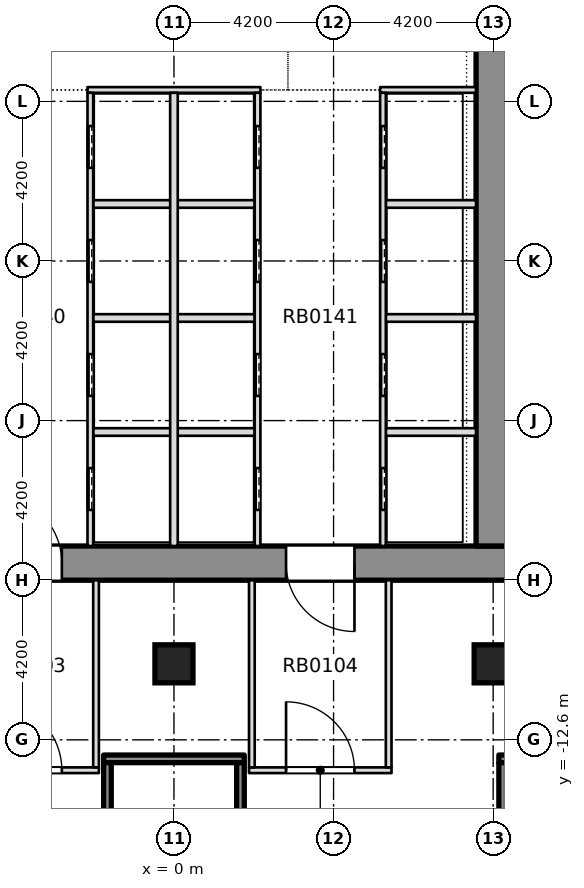
"""IFC4 building model, lengths in metres.
Left out: names, types, materials, properties, quantities, classifications, styles, units other than length and angle.
Written with IfcOpenShell. Run it as: python <this file> out.ifc"""

import sys

from ifc_helpers import new_model, si_unit, direction, frame, frame_2d, origin, origin_2d, place, context, subcontext, project, spatial, rectangle, extrude, element, fill, save


model = new_model("IFC4")
c1 = context("Model", 3, precision=1e-05, world=origin(), true_north=direction((0.0, 1.0)))
c2 = subcontext(c1, "Body", "Model", "MODEL_VIEW")
j1 = project(units=[si_unit("LENGTHUNIT", "METRE"), si_unit("PLANEANGLEUNIT", "RADIAN")], contexts=[c1])
p1 = place(None, origin())
s1 = spatial("IfcSite", under=j1, at=p1, CompositionType="ELEMENT")
p2 = place(p1, origin())
s2 = spatial("IfcBuilding", under=s1, at=p2, CompositionType="ELEMENT")
p3 = place(p2, frame((0.0, 0.0, -4.2)))
s3 = spatial("IfcBuildingStorey", under=s2, at=p3, CompositionType="ELEMENT", Elevation=-4.2)
p4 = place(p3, frame((-11.7, -7.95, -0.35), z_axis=(0.0, 0.0, 1.0), x_axis=(1.0, 0.0, 0.0)))
e1 = element("IfcWall", 1, at=p4, inside=s3, PredefinedType="SHEAR", context=c2, shape_type="SweptSolid", body=[
    extrude(rectangle(XDim=23.4, YDim=0.9, at=frame_2d((11.7, 0.0))), origin(), (0.0, 0.0, 1.0), 4.1),
])
p5 = place(p4, frame((6.95, 0.0, 0.35)))
e2 = element("IfcOpeningElement", 2, at=p5, cuts=e1, PredefinedType="OPENING", context=c2, shape_type="SweptSolid", body=[
    extrude(rectangle(XDim=1.8, YDim=2.1, at=frame_2d((0.9, 1.05))), frame((0.0, 0.46, 0.0), z_axis=(0.0, -1.0, 0.0), x_axis=(1.0, 0.0, 0.0)), (0.0, 0.0, 1.0), 0.92),
])
p6 = place(p4, frame((14.65, 0.0, 0.35)))
e3 = element("IfcOpeningElement", 3, at=p6, cuts=e1, PredefinedType="OPENING", context=c2, shape_type="SweptSolid", body=[
    extrude(rectangle(XDim=1.8, YDim=2.1, at=frame_2d((0.9, 1.05))), frame((0.0, 0.46, 0.0), z_axis=(0.0, -1.0, 0.0), x_axis=(1.0, 0.0, 0.0)), (0.0, 0.0, 1.0), 0.92),
])
p7 = place(p3, frame((8.4, -7.5, -0.35), z_axis=(0.0, 0.0, 1.0), x_axis=(0.0, 1.0, 0.0)))
e4 = element("IfcWall", 4, at=p7, inside=s3, PredefinedType="SHEAR", context=c2, shape_type="SweptSolid", body=[
    extrude(rectangle(XDim=28.35, YDim=0.9, at=frame_2d((14.175, 0.0))), origin(), (0.0, 0.0, 1.0), 4.1),
])
p8 = place(p7, frame((18.4, 0.0, 0.35)))
e5 = element("IfcOpeningElement", 5, at=p8, cuts=e4, PredefinedType="OPENING", context=c2, shape_type="SweptSolid", body=[
    extrude(rectangle(XDim=1.2, YDim=2.1, at=frame_2d((0.6, 1.05))), frame((0.0, 0.46, 0.0), z_axis=(0.0, -1.0, 0.0), x_axis=(1.0, 0.0, 0.0)), (0.0, 0.0, 1.0), 0.92),
])
for number, where, z_axis, x_axis in (
    (6, (0.0, -10.6, -0.35), (0.0, 0.0, 1.0), (1.0, 0.0, 0.0)),
    (7, (8.4, -10.6, -0.35), (0.0, 0.0, 1.0), (1.0, 0.0, 0.0)),
):
    element("IfcColumn", number, at=place(p3, frame(where, z_axis=z_axis, x_axis=x_axis)), inside=s3, PredefinedType="COLUMN", context=c2, shape_type="SweptSolid", body=[
        extrude(rectangle(XDim=1.0, YDim=1.0, at=origin_2d()), origin(), (0.0, 0.0, 1.0), 4.1),
    ])
p9 = place(p3, frame((-5.725, -13.4, 0.0), z_axis=(0.0, 0.0, 1.0), x_axis=(1.0, 0.0, 0.0)))
e8 = element("IfcWall", 8, at=p9, inside=s3, PredefinedType="PARTITIONING", context=c2, shape_type="SweptSolid", body=[
    extrude(rectangle(XDim=3.75, YDim=0.15, at=frame_2d((1.875, 0.0))), origin(), (0.0, 0.0, 1.0), 3.75),
])
p10 = place(p9, frame((0.975, 0.0, 0.0)))
e9 = element("IfcOpeningElement", 9, at=p10, cuts=e8, PredefinedType="OPENING", context=c2, shape_type="SweptSolid", body=[
    extrude(rectangle(XDim=1.8, YDim=2.1, at=frame_2d((0.9, 1.05))), frame((0.0, 0.085, 0.0), z_axis=(0.0, -1.0, 0.0), x_axis=(1.0, 0.0, 0.0)), (0.0, 0.0, 1.0), 0.17),
])
p11 = place(p3, frame((1.975, -13.4, 0.0), z_axis=(0.0, 0.0, 1.0), x_axis=(1.0, 0.0, 0.0)))
e10 = element("IfcWall", 10, at=p11, inside=s3, PredefinedType="PARTITIONING", context=c2, shape_type="SweptSolid", body=[
    extrude(rectangle(XDim=3.75, YDim=0.15, at=frame_2d((1.875, 0.0))), origin(), (0.0, 0.0, 1.0), 3.75),
])
p12 = place(p11, frame((0.975, 0.0, 0.0)))
e11 = element("IfcOpeningElement", 11, at=p12, cuts=e10, PredefinedType="OPENING", context=c2, shape_type="SweptSolid", body=[
    extrude(rectangle(XDim=1.8, YDim=2.1, at=frame_2d((0.9, 1.05))), frame((0.0, 0.085, 0.0), z_axis=(0.0, -1.0, 0.0), x_axis=(1.0, 0.0, 0.0)), (0.0, 0.0, 1.0), 0.17),
])
for number, where, z_axis, x_axis in (
    (12, (-2.05, -13.325, 0.0), (0.0, 0.0, 1.0), (0.0, 1.0, 0.0)),
    (13, (2.05, -13.325, 0.0), (0.0, 0.0, 1.0), (0.0, 1.0, 0.0)),
    (14, (5.65, -13.325, 0.0), (0.0, 0.0, 1.0), (0.0, 1.0, 0.0)),
):
    element("IfcWall", number, at=place(p3, frame(where, z_axis=z_axis, x_axis=x_axis)), inside=s3, PredefinedType="PARTITIONING", context=c2, shape_type="SweptSolid", body=[
        extrude(rectangle(XDim=4.924, YDim=0.15, at=frame_2d((2.462, 0.0))), origin(), (0.0, 0.0, 1.0), 3.75),
    ])
p13 = place(p3, frame((-2.125, -4.5, 0.0), z_axis=(0.0, 0.0, 1.0), x_axis=(1.0, 0.0, 0.0)))
e15 = element("IfcWall", 15, at=p13, inside=s3, PredefinedType="PARTITIONING", context=c2, shape_type="SweptSolid", body=[
    extrude(rectangle(XDim=4.25, YDim=0.2, at=frame_2d((2.125, 0.0))), origin(), (0.0, 0.0, 1.0), 3.75),
])
p14 = place(p3, frame((5.575, -4.5, 0.0), z_axis=(0.0, 0.0, 1.0), x_axis=(1.0, 0.0, 0.0)))
e16 = element("IfcWall", 16, at=p14, inside=s3, PredefinedType="PARTITIONING", context=c2, shape_type="SweptSolid", body=[
    extrude(rectangle(XDim=2.374, YDim=0.2, at=frame_2d((1.187, 0.0))), origin(), (0.0, 0.0, 1.0), 3.75),
])
p15 = place(p3, frame((-2.125, -1.5, 0.0), z_axis=(0.0, 0.0, 1.0), x_axis=(1.0, 0.0, 0.0)))
e17 = element("IfcWall", 17, at=p15, inside=s3, PredefinedType="PARTITIONING", context=c2, shape_type="SweptSolid", body=[
    extrude(rectangle(XDim=4.25, YDim=0.2, at=frame_2d((2.125, 0.0))), origin(), (0.0, 0.0, 1.0), 3.75),
])
p16 = place(p3, frame((5.575, -1.5, 0.0), z_axis=(0.0, 0.0, 1.0), x_axis=(1.0, 0.0, 0.0)))
e18 = element("IfcWall", 18, at=p16, inside=s3, PredefinedType="PARTITIONING", context=c2, shape_type="SweptSolid", body=[
    extrude(rectangle(XDim=2.374, YDim=0.2, at=frame_2d((1.187, 0.0))), origin(), (0.0, 0.0, 1.0), 3.75),
])
p17 = place(p3, frame((-2.125, 1.5, 0.0), z_axis=(0.0, 0.0, 1.0), x_axis=(1.0, 0.0, 0.0)))
e19 = element("IfcWall", 19, at=p17, inside=s3, PredefinedType="PARTITIONING", context=c2, shape_type="SweptSolid", body=[
    extrude(rectangle(XDim=4.25, YDim=0.2, at=frame_2d((2.125, 0.0))), origin(), (0.0, 0.0, 1.0), 3.75),
])
p18 = place(p3, frame((5.575, 1.5, 0.0), z_axis=(0.0, 0.0, 1.0), x_axis=(1.0, 0.0, 0.0)))
e20 = element("IfcWall", 20, at=p18, inside=s3, PredefinedType="PARTITIONING", context=c2, shape_type="SweptSolid", body=[
    extrude(rectangle(XDim=2.374, YDim=0.2, at=frame_2d((1.187, 0.0))), origin(), (0.0, 0.0, 1.0), 3.75),
])
p19 = place(p3, frame((-2.275, 4.5, 0.0), z_axis=(0.0, 0.0, 1.0), x_axis=(1.0, 0.0, 0.0)))
e21 = element("IfcWall", 21, at=p19, inside=s3, PredefinedType="PARTITIONING", context=c2, shape_type="SweptSolid", body=[
    extrude(rectangle(XDim=4.55, YDim=0.15, at=frame_2d((2.275, 0.0))), origin(), (0.0, 0.0, 1.0), 3.75),
])
p20 = place(p3, frame((5.425, 4.5, 0.0), z_axis=(0.0, 0.0, 1.0), x_axis=(1.0, 0.0, 0.0)))
e22 = element("IfcWall", 22, at=p20, inside=s3, PredefinedType="PARTITIONING", context=c2, shape_type="SweptSolid", body=[
    extrude(rectangle(XDim=2.524, YDim=0.15, at=frame_2d((1.262, 0.0))), origin(), (0.0, 0.0, 1.0), 3.75),
])
p21 = place(p3, frame((-2.2, -7.499, 0.0), z_axis=(0.0, 0.0, 1.0), x_axis=(0.0, 1.0, 0.0)))
e23 = element("IfcWall", 23, at=p21, inside=s3, PredefinedType="PARTITIONING", context=c2, shape_type="SweptSolid", body=[
    extrude(rectangle(XDim=11.924, YDim=0.15, at=frame_2d((5.962, 0.0))), origin(), (0.0, 0.0, 1.0), 3.75),
])
p22 = place(p21, frame((0.949, 0.0, 0.0)))
e24 = element("IfcOpeningElement", 24, at=p22, cuts=e23, PredefinedType="OPENING", context=c2, shape_type="SweptSolid", body=[
    extrude(rectangle(XDim=1.1, YDim=2.1, at=frame_2d((0.55, 1.05))), frame((0.0, 0.085, 0.0), z_axis=(0.0, -1.0, 0.0), x_axis=(1.0, 0.0, 0.0)), (0.0, 0.0, 1.0), 0.17),
])
p23 = place(p21, frame((3.949, 0.0, 0.0)))
e25 = element("IfcOpeningElement", 25, at=p23, cuts=e23, PredefinedType="OPENING", context=c2, shape_type="SweptSolid", body=[
    extrude(rectangle(XDim=1.1, YDim=2.1, at=frame_2d((0.55, 1.05))), frame((0.0, 0.085, 0.0), z_axis=(0.0, -1.0, 0.0), x_axis=(1.0, 0.0, 0.0)), (0.0, 0.0, 1.0), 0.17),
])
p24 = place(p21, frame((6.949, 0.0, 0.0)))
e26 = element("IfcOpeningElement", 26, at=p24, cuts=e23, PredefinedType="OPENING", context=c2, shape_type="SweptSolid", body=[
    extrude(rectangle(XDim=1.1, YDim=2.1, at=frame_2d((0.55, 1.05))), frame((0.0, 0.085, 0.0), z_axis=(0.0, -1.0, 0.0), x_axis=(1.0, 0.0, 0.0)), (0.0, 0.0, 1.0), 0.17),
])
p25 = place(p21, frame((9.949, 0.0, 0.0)))
e27 = element("IfcOpeningElement", 27, at=p25, cuts=e23, PredefinedType="OPENING", context=c2, shape_type="SweptSolid", body=[
    extrude(rectangle(XDim=1.1, YDim=2.1, at=frame_2d((0.55, 1.05))), frame((0.0, 0.085, 0.0), z_axis=(0.0, -1.0, 0.0), x_axis=(1.0, 0.0, 0.0)), (0.0, 0.0, 1.0), 0.17),
])
p26 = place(p3, frame((0.0, -7.499, 0.0), z_axis=(0.0, 0.0, 1.0), x_axis=(0.0, 1.0, 0.0)))
e28 = element("IfcWall", 28, at=p26, inside=s3, PredefinedType="PARTITIONING", context=c2, shape_type="SweptSolid", body=[
    extrude(rectangle(XDim=11.924, YDim=0.2, at=frame_2d((5.962, 0.0))), origin(), (0.0, 0.0, 1.0), 3.75),
])
p27 = place(p3, frame((2.2, -7.499, 0.0), z_axis=(0.0, 0.0, 1.0), x_axis=(0.0, 1.0, 0.0)))
e29 = element("IfcWall", 29, at=p27, inside=s3, PredefinedType="PARTITIONING", context=c2, shape_type="SweptSolid", body=[
    extrude(rectangle(XDim=11.924, YDim=0.15, at=frame_2d((5.962, 0.0))), origin(), (0.0, 0.0, 1.0), 3.75),
])
p28 = place(p27, frame((0.949, 0.0, 0.0)))
e30 = element("IfcOpeningElement", 30, at=p28, cuts=e29, PredefinedType="OPENING", context=c2, shape_type="SweptSolid", body=[
    extrude(rectangle(XDim=1.1, YDim=2.1, at=frame_2d((0.55, 1.05))), frame((0.0, 0.085, 0.0), z_axis=(0.0, -1.0, 0.0), x_axis=(1.0, 0.0, 0.0)), (0.0, 0.0, 1.0), 0.17),
])
p29 = place(p27, frame((3.949, 0.0, 0.0)))
e31 = element("IfcOpeningElement", 31, at=p29, cuts=e29, PredefinedType="OPENING", context=c2, shape_type="SweptSolid", body=[
    extrude(rectangle(XDim=1.1, YDim=2.1, at=frame_2d((0.55, 1.05))), frame((0.0, 0.085, 0.0), z_axis=(0.0, -1.0, 0.0), x_axis=(1.0, 0.0, 0.0)), (0.0, 0.0, 1.0), 0.17),
])
p30 = place(p27, frame((6.949, 0.0, 0.0)))
e32 = element("IfcOpeningElement", 32, at=p30, cuts=e29, PredefinedType="OPENING", context=c2, shape_type="SweptSolid", body=[
    extrude(rectangle(XDim=1.1, YDim=2.1, at=frame_2d((0.55, 1.05))), frame((0.0, 0.085, 0.0), z_axis=(0.0, -1.0, 0.0), x_axis=(1.0, 0.0, 0.0)), (0.0, 0.0, 1.0), 0.17),
])
p31 = place(p27, frame((9.949, 0.0, 0.0)))
e33 = element("IfcOpeningElement", 33, at=p31, cuts=e29, PredefinedType="OPENING", context=c2, shape_type="SweptSolid", body=[
    extrude(rectangle(XDim=1.1, YDim=2.1, at=frame_2d((0.55, 1.05))), frame((0.0, 0.085, 0.0), z_axis=(0.0, -1.0, 0.0), x_axis=(1.0, 0.0, 0.0)), (0.0, 0.0, 1.0), 0.17),
])
p32 = place(p3, frame((5.5, -7.499, 0.0), z_axis=(0.0, 0.0, 1.0), x_axis=(0.0, 1.0, 0.0)))
e34 = element("IfcWall", 34, at=p32, inside=s3, PredefinedType="PARTITIONING", context=c2, shape_type="SweptSolid", body=[
    extrude(rectangle(XDim=11.924, YDim=0.15, at=frame_2d((5.962, 0.0))), origin(), (0.0, 0.0, 1.0), 3.75),
])
p33 = place(p32, frame((0.949, 0.0, 0.0)))
e35 = element("IfcOpeningElement", 35, at=p33, cuts=e34, PredefinedType="OPENING", context=c2, shape_type="SweptSolid", body=[
    extrude(rectangle(XDim=1.1, YDim=2.1, at=frame_2d((0.55, 1.05))), frame((0.0, 0.085, 0.0), z_axis=(0.0, -1.0, 0.0), x_axis=(1.0, 0.0, 0.0)), (0.0, 0.0, 1.0), 0.17),
])
p34 = place(p32, frame((3.949, 0.0, 0.0)))
e36 = element("IfcOpeningElement", 36, at=p34, cuts=e34, PredefinedType="OPENING", context=c2, shape_type="SweptSolid", body=[
    extrude(rectangle(XDim=1.1, YDim=2.1, at=frame_2d((0.55, 1.05))), frame((0.0, 0.085, 0.0), z_axis=(0.0, -1.0, 0.0), x_axis=(1.0, 0.0, 0.0)), (0.0, 0.0, 1.0), 0.17),
])
p35 = place(p32, frame((6.949, 0.0, 0.0)))
e37 = element("IfcOpeningElement", 37, at=p35, cuts=e34, PredefinedType="OPENING", context=c2, shape_type="SweptSolid", body=[
    extrude(rectangle(XDim=1.1, YDim=2.1, at=frame_2d((0.55, 1.05))), frame((0.0, 0.085, 0.0), z_axis=(0.0, -1.0, 0.0), x_axis=(1.0, 0.0, 0.0)), (0.0, 0.0, 1.0), 0.17),
])
p36 = place(p32, frame((9.949, 0.0, 0.0)))
e38 = element("IfcOpeningElement", 38, at=p36, cuts=e34, PredefinedType="OPENING", context=c2, shape_type="SweptSolid", body=[
    extrude(rectangle(XDim=1.1, YDim=2.1, at=frame_2d((0.55, 1.05))), frame((0.0, 0.085, 0.0), z_axis=(0.0, -1.0, 0.0), x_axis=(1.0, 0.0, 0.0)), (0.0, 0.0, 1.0), 0.17),
])
p37 = place(p3, frame((-1.85, -13.1, 0.0), z_axis=(0.0, 0.0, 1.0), x_axis=(1.0, 0.0, 0.0)))
e39 = element("IfcWall", 39, at=p37, inside=s3, PredefinedType="SOLIDWALL", context=c2, shape_type="SweptSolid", body=[
    extrude(rectangle(XDim=3.7, YDim=0.2, at=frame_2d((1.85, 0.0))), origin(), (0.0, 0.0, 1.0), 3.75),
])
for number, where, z_axis, x_axis in (
    (40, (-1.75, -19.8, 0.0), (0.0, 0.0, 1.0), (0.0, 1.0, 0.0)),
    (41, (1.75, -19.8, 0.0), (0.0, 0.0, 1.0), (0.0, 1.0, 0.0)),
):
    element("IfcWall", number, at=place(p3, frame(where, z_axis=z_axis, x_axis=x_axis)), inside=s3, PredefinedType="SOLIDWALL", context=c2, shape_type="SweptSolid", body=[
        extrude(rectangle(XDim=6.6, YDim=0.2, at=frame_2d((3.3, 0.0))), origin(), (0.0, 0.0, 1.0), 3.75),
    ])
p38 = place(p3, frame((8.55, -13.1, 0.0), z_axis=(0.0, 0.0, 1.0), x_axis=(1.0, 0.0, 0.0)))
e42 = element("IfcWall", 42, at=p38, inside=s3, PredefinedType="SOLIDWALL", context=c2, shape_type="SweptSolid", body=[
    extrude(rectangle(XDim=3.7, YDim=0.2, at=frame_2d((1.85, 0.0))), origin(), (0.0, 0.0, 1.0), 3.75),
])
p39 = place(p3, frame((8.65, -20.3, 0.0), z_axis=(0.0, 0.0, 1.0), x_axis=(0.0, 1.0, 0.0)))
e43 = element("IfcWall", 43, at=p39, inside=s3, PredefinedType="SOLIDWALL", context=c2, shape_type="SweptSolid", body=[
    extrude(rectangle(XDim=7.1, YDim=0.2, at=frame_2d((3.55, 0.0))), origin(), (0.0, 0.0, 1.0), 3.75),
])
p40 = place(p10, origin())
e44 = element("IfcDoor", 44, at=p40, inside=s3, OperationType="DOUBLE_DOOR_SINGLE_SWING", PredefinedType="DOOR", context=c2, shape_type="SweptSolid", body=[
    extrude(rectangle(XDim=1.8, YDim=2.1, at=frame_2d((0.9, 1.05))), frame((0.0, 0.025, 0.0), z_axis=(0.0, -1.0, 0.0), x_axis=(1.0, 0.0, 0.0)), (0.0, 0.0, 1.0), 0.05),
])
fill(e9, e44)
p41 = place(p12, origin())
e45 = element("IfcDoor", 45, at=p41, inside=s3, OperationType="DOUBLE_DOOR_SINGLE_SWING", PredefinedType="DOOR", context=c2, shape_type="SweptSolid", body=[
    extrude(rectangle(XDim=1.8, YDim=2.1, at=frame_2d((0.9, 1.05))), frame((0.0, 0.025, 0.0), z_axis=(0.0, -1.0, 0.0), x_axis=(1.0, 0.0, 0.0)), (0.0, 0.0, 1.0), 0.05),
])
fill(e11, e45)
p42 = place(p22, origin())
e46 = element("IfcDoor", 46, at=p42, inside=s3, OperationType="SLIDING_TO_RIGHT", PredefinedType="DOOR", context=c2, shape_type="SweptSolid", body=[
    extrude(rectangle(XDim=1.1, YDim=2.1, at=frame_2d((0.55, 1.05))), frame((0.0, 0.025, 0.0), z_axis=(0.0, -1.0, 0.0), x_axis=(1.0, 0.0, 0.0)), (0.0, 0.0, 1.0), 0.05),
])
fill(e24, e46)
p43 = place(p23, origin())
e47 = element("IfcDoor", 47, at=p43, inside=s3, OperationType="SLIDING_TO_RIGHT", PredefinedType="DOOR", context=c2, shape_type="SweptSolid", body=[
    extrude(rectangle(XDim=1.1, YDim=2.1, at=frame_2d((0.55, 1.05))), frame((0.0, 0.025, 0.0), z_axis=(0.0, -1.0, 0.0), x_axis=(1.0, 0.0, 0.0)), (0.0, 0.0, 1.0), 0.05),
])
fill(e25, e47)
p44 = place(p24, origin())
e48 = element("IfcDoor", 48, at=p44, inside=s3, OperationType="SLIDING_TO_RIGHT", PredefinedType="DOOR", context=c2, shape_type="SweptSolid", body=[
    extrude(rectangle(XDim=1.1, YDim=2.1, at=frame_2d((0.55, 1.05))), frame((0.0, 0.025, 0.0), z_axis=(0.0, -1.0, 0.0), x_axis=(1.0, 0.0, 0.0)), (0.0, 0.0, 1.0), 0.05),
])
fill(e26, e48)
p45 = place(p25, origin())
e49 = element("IfcDoor", 49, at=p45, inside=s3, OperationType="SLIDING_TO_RIGHT", PredefinedType="DOOR", context=c2, shape_type="SweptSolid", body=[
    extrude(rectangle(XDim=1.1, YDim=2.1, at=frame_2d((0.55, 1.05))), frame((0.0, 0.025, 0.0), z_axis=(0.0, -1.0, 0.0), x_axis=(1.0, 0.0, 0.0)), (0.0, 0.0, 1.0), 0.05),
])
fill(e27, e49)
p46 = place(p28, origin())
e50 = element("IfcDoor", 50, at=p46, inside=s3, OperationType="SLIDING_TO_RIGHT", PredefinedType="DOOR", context=c2, shape_type="SweptSolid", body=[
    extrude(rectangle(XDim=1.1, YDim=2.1, at=frame_2d((0.55, 1.05))), frame((0.0, 0.025, 0.0), z_axis=(0.0, -1.0, 0.0), x_axis=(1.0, 0.0, 0.0)), (0.0, 0.0, 1.0), 0.05),
])
fill(e30, e50)
p47 = place(p29, origin())
e51 = element("IfcDoor", 51, at=p47, inside=s3, OperationType="SLIDING_TO_RIGHT", PredefinedType="DOOR", context=c2, shape_type="SweptSolid", body=[
    extrude(rectangle(XDim=1.1, YDim=2.1, at=frame_2d((0.55, 1.05))), frame((0.0, 0.025, 0.0), z_axis=(0.0, -1.0, 0.0), x_axis=(1.0, 0.0, 0.0)), (0.0, 0.0, 1.0), 0.05),
])
fill(e31, e51)
p48 = place(p30, origin())
e52 = element("IfcDoor", 52, at=p48, inside=s3, OperationType="SLIDING_TO_RIGHT", PredefinedType="DOOR", context=c2, shape_type="SweptSolid", body=[
    extrude(rectangle(XDim=1.1, YDim=2.1, at=frame_2d((0.55, 1.05))), frame((0.0, 0.025, 0.0), z_axis=(0.0, -1.0, 0.0), x_axis=(1.0, 0.0, 0.0)), (0.0, 0.0, 1.0), 0.05),
])
fill(e32, e52)
p49 = place(p31, origin())
e53 = element("IfcDoor", 53, at=p49, inside=s3, OperationType="SLIDING_TO_RIGHT", PredefinedType="DOOR", context=c2, shape_type="SweptSolid", body=[
    extrude(rectangle(XDim=1.1, YDim=2.1, at=frame_2d((0.55, 1.05))), frame((0.0, 0.025, 0.0), z_axis=(0.0, -1.0, 0.0), x_axis=(1.0, 0.0, 0.0)), (0.0, 0.0, 1.0), 0.05),
])
fill(e33, e53)
p50 = place(p33, origin())
e54 = element("IfcDoor", 54, at=p50, inside=s3, OperationType="SLIDING_TO_RIGHT", PredefinedType="DOOR", context=c2, shape_type="SweptSolid", body=[
    extrude(rectangle(XDim=1.1, YDim=2.1, at=frame_2d((0.55, 1.05))), frame((0.0, 0.025, 0.0), z_axis=(0.0, -1.0, 0.0), x_axis=(1.0, 0.0, 0.0)), (0.0, 0.0, 1.0), 0.05),
])
fill(e35, e54)
p51 = place(p34, origin())
e55 = element("IfcDoor", 55, at=p51, inside=s3, OperationType="SLIDING_TO_RIGHT", PredefinedType="DOOR", context=c2, shape_type="SweptSolid", body=[
    extrude(rectangle(XDim=1.1, YDim=2.1, at=frame_2d((0.55, 1.05))), frame((0.0, 0.025, 0.0), z_axis=(0.0, -1.0, 0.0), x_axis=(1.0, 0.0, 0.0)), (0.0, 0.0, 1.0), 0.05),
])
fill(e36, e55)
p52 = place(p35, origin())
e56 = element("IfcDoor", 56, at=p52, inside=s3, OperationType="SLIDING_TO_RIGHT", PredefinedType="DOOR", context=c2, shape_type="SweptSolid", body=[
    extrude(rectangle(XDim=1.1, YDim=2.1, at=frame_2d((0.55, 1.05))), frame((0.0, 0.025, 0.0), z_axis=(0.0, -1.0, 0.0), x_axis=(1.0, 0.0, 0.0)), (0.0, 0.0, 1.0), 0.05),
])
fill(e37, e56)
p53 = place(p36, origin())
e57 = element("IfcDoor", 57, at=p53, inside=s3, OperationType="SLIDING_TO_RIGHT", PredefinedType="DOOR", context=c2, shape_type="SweptSolid", body=[
    extrude(rectangle(XDim=1.1, YDim=2.1, at=frame_2d((0.55, 1.05))), frame((0.0, 0.025, 0.0), z_axis=(0.0, -1.0, 0.0), x_axis=(1.0, 0.0, 0.0)), (0.0, 0.0, 1.0), 0.05),
])
fill(e38, e57)
p54 = place(p5, origin())
e58 = element("IfcDoor", 58, at=p54, inside=s3, OperationType="SINGLE_SWING_LEFT", PredefinedType="DOOR", context=c2, shape_type="SweptSolid", body=[
    extrude(rectangle(XDim=1.8, YDim=2.1, at=frame_2d((0.9, 1.05))), frame((0.0, 0.025, 0.0), z_axis=(0.0, -1.0, 0.0), x_axis=(1.0, 0.0, 0.0)), (0.0, 0.0, 1.0), 0.05),
])
fill(e2, e58)
p55 = place(p6, origin())
e59 = element("IfcDoor", 59, at=p55, inside=s3, OperationType="SINGLE_SWING_LEFT", PredefinedType="DOOR", context=c2, shape_type="SweptSolid", body=[
    extrude(rectangle(XDim=1.8, YDim=2.1, at=frame_2d((0.9, 1.05))), frame((0.0, 0.025, 0.0), z_axis=(0.0, -1.0, 0.0), x_axis=(1.0, 0.0, 0.0)), (0.0, 0.0, 1.0), 0.05),
])
fill(e3, e59)
save(model, sys.argv[1])
